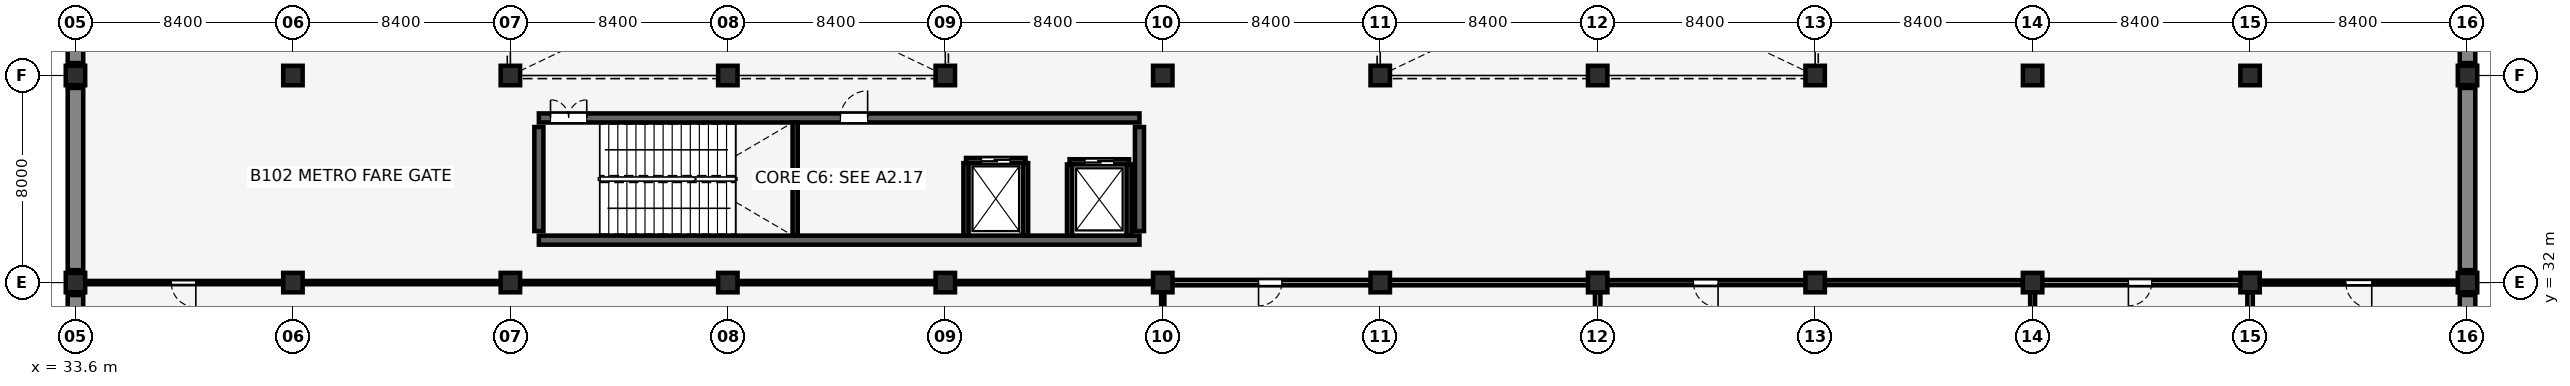
"""IFC4 building model, lengths in metres.
Left out: names, types, materials, properties, quantities, classifications, styles, units other than length and angle.
Written with IfcOpenShell. Run it as: python <this file> out.ifc"""

import sys

from ifc_helpers import new_model, si_unit, direction, frame, frame_2d, origin, origin_2d, place, context, subcontext, project, spatial, rectangle, extrude, element, fill, save


model = new_model("IFC4")
c1 = context("Model", 3, precision=1e-05, world=origin(), true_north=direction((0.0, 1.0)))
c2 = subcontext(c1, "Body", "Model", "MODEL_VIEW")
j1 = project(units=[si_unit("LENGTHUNIT", "METRE"), si_unit("PLANEANGLEUNIT", "RADIAN")], contexts=[c1])
p1 = place(None, origin())
s1 = spatial("IfcSite", under=j1, at=p1, CompositionType="ELEMENT")
p2 = place(p1, origin())
s2 = spatial("IfcBuilding", under=s1, at=p2, CompositionType="ELEMENT")
p3 = place(p2, frame((0.0, 0.0, -5.44)))
s3 = spatial("IfcBuildingStorey", under=s2, at=p3, CompositionType="ELEMENT", Elevation=-5.44)
for number, where, z_axis, x_axis in (
    (1, (33.6, 24.48, 0.0), (0.0, 0.0, 1.0), (0.0, 1.0, 0.0)),
    (2, (33.6, 32.48, 0.0), (0.0, 0.0, 1.0), (0.0, 1.0, 0.0)),
    (3, (33.6, 40.48, 0.0), (0.0, 0.0, 1.0), (0.0, 1.0, 0.0)),
    (4, (126.0, 24.48, 0.0), (0.0, 0.0, 1.0), (0.0, 1.0, 0.0)),
    (5, (126.0, 32.48, 0.0), (0.0, 0.0, 1.0), (0.0, 1.0, 0.0)),
    (6, (126.0, 40.48, 0.0), (0.0, 0.0, 1.0), (0.0, 1.0, 0.0)),
):
    element("IfcWall", number, at=place(p3, frame(where, z_axis=z_axis, x_axis=x_axis)), inside=s3, PredefinedType="SOLIDWALL", context=c2, shape_type="SweptSolid", body=[
        extrude(rectangle(XDim=7.04, YDim=0.6, at=frame_2d((3.52, 0.0))), origin(), (0.0, 0.0, 1.0), 5.02),
    ])
p4 = place(p3, frame((51.5, 33.64, 0.0), z_axis=(0.0, 0.0, 1.0), x_axis=(1.0, 0.0, 0.0)))
e7 = element("IfcWall", 7, at=p4, inside=s3, PredefinedType="SHEAR", context=c2, shape_type="SweptSolid", body=[
    extrude(rectangle(XDim=23.2, YDim=0.35, at=frame_2d((11.6, 0.0))), origin(), (0.0, 0.0, 1.0), 5.02),
])
p5 = place(p3, frame((51.5, 38.36, 0.0), z_axis=(0.0, 0.0, 1.0), x_axis=(1.0, 0.0, 0.0)))
e8 = element("IfcWall", 8, at=p5, inside=s3, PredefinedType="SHEAR", context=c2, shape_type="SweptSolid", body=[
    extrude(rectangle(XDim=23.2, YDim=0.35, at=frame_2d((11.6, 0.0))), origin(), (0.0, 0.0, 1.0), 5.02),
])
p6 = place(p5, frame((0.45, 0.0, 0.0), z_axis=(0.0, 0.0, 1.0), x_axis=(1.0, 0.0, 0.0)))
e9 = element("IfcOpeningElement", 9, at=p6, cuts=e8, PredefinedType="OPENING", context=c2, shape_type="SweptSolid", body=[
    extrude(rectangle(XDim=1.4, YDim=2.15, at=frame_2d((0.7, 1.075))), frame((0.0, 0.185, 0.0), z_axis=(0.0, -1.0, 0.0), x_axis=(1.0, 0.0, 0.0)), (0.0, 0.0, 1.0), 0.37),
])
p7 = place(p5, frame((11.65, 0.0, 0.0), z_axis=(0.0, 0.0, 1.0), x_axis=(1.0, 0.0, 0.0)))
e10 = element("IfcOpeningElement", 10, at=p7, cuts=e8, PredefinedType="OPENING", context=c2, shape_type="SweptSolid", body=[
    extrude(rectangle(XDim=1.05, YDim=2.15, at=frame_2d((0.525, 1.075))), frame((0.0, 0.185, 0.0), z_axis=(0.0, -1.0, 0.0), x_axis=(1.0, 0.0, 0.0)), (0.0, 0.0, 1.0), 0.37),
])
for number, where, z_axis, x_axis in (
    (11, (51.5, 33.99, 0.0), (0.0, 0.0, 1.0), (0.0, 1.0, 0.0)),
    (12, (74.7, 33.99, 0.0), (0.0, 0.0, 1.0), (0.0, 1.0, 0.0)),
):
    element("IfcWall", number, at=place(p3, frame(where, z_axis=z_axis, x_axis=x_axis)), inside=s3, PredefinedType="SHEAR", context=c2, shape_type="SweptSolid", body=[
        extrude(rectangle(XDim=4.02, YDim=0.35, at=frame_2d((2.01, 0.0))), origin(), (0.0, 0.0, 1.0), 5.02),
    ])
for number, where, z_axis, x_axis in (
    (13, (33.6, 32.0, 0.0), (0.0, 0.0, 1.0), (1.0, 0.0, 0.0)),
    (14, (33.6, 40.0, 0.0), (0.0, 0.0, 1.0), (1.0, 0.0, 0.0)),
    (15, (42.0, 32.0, 0.0), (0.0, 0.0, 1.0), (1.0, 0.0, 0.0)),
    (16, (42.0, 40.0, 0.0), (0.0, 0.0, 1.0), (1.0, 0.0, 0.0)),
    (17, (50.4, 32.0, 0.0), (0.0, 0.0, 1.0), (1.0, 0.0, 0.0)),
    (18, (50.4, 40.0, 0.0), (0.0, 0.0, 1.0), (1.0, 0.0, 0.0)),
    (19, (58.8, 32.0, 0.0), (0.0, 0.0, 1.0), (1.0, 0.0, 0.0)),
    (20, (58.8, 40.0, 0.0), (0.0, 0.0, 1.0), (1.0, 0.0, 0.0)),
    (21, (67.2, 32.0, 0.0), (0.0, 0.0, 1.0), (1.0, 0.0, 0.0)),
    (22, (67.2, 40.0, 0.0), (0.0, 0.0, 1.0), (1.0, 0.0, 0.0)),
    (23, (75.6, 32.0, 0.0), (0.0, 0.0, 1.0), (1.0, 0.0, 0.0)),
    (24, (75.6, 40.0, 0.0), (0.0, 0.0, 1.0), (1.0, 0.0, 0.0)),
    (25, (84.0, 32.0, 0.0), (0.0, 0.0, 1.0), (1.0, 0.0, 0.0)),
    (26, (84.0, 40.0, 0.0), (0.0, 0.0, 1.0), (1.0, 0.0, 0.0)),
    (27, (92.4, 32.0, 0.0), (0.0, 0.0, 1.0), (1.0, 0.0, 0.0)),
    (28, (92.4, 40.0, 0.0), (0.0, 0.0, 1.0), (1.0, 0.0, 0.0)),
    (29, (100.8, 32.0, 0.0), (0.0, 0.0, 1.0), (1.0, 0.0, 0.0)),
    (30, (100.8, 40.0, 0.0), (0.0, 0.0, 1.0), (1.0, 0.0, 0.0)),
    (31, (109.2, 32.0, 0.0), (0.0, 0.0, 1.0), (1.0, 0.0, 0.0)),
    (32, (109.2, 40.0, 0.0), (0.0, 0.0, 1.0), (1.0, 0.0, 0.0)),
    (33, (117.6, 32.0, 0.0), (0.0, 0.0, 1.0), (1.0, 0.0, 0.0)),
    (34, (117.6, 40.0, 0.0), (0.0, 0.0, 1.0), (1.0, 0.0, 0.0)),
    (35, (126.0, 32.0, 0.0), (0.0, 0.0, 1.0), (1.0, 0.0, 0.0)),
    (36, (126.0, 40.0, 0.0), (0.0, 0.0, 1.0), (1.0, 0.0, 0.0)),
):
    element("IfcColumn", number, at=place(p3, frame(where, z_axis=z_axis, x_axis=x_axis)), inside=s3, PredefinedType="COLUMN", context=c2, shape_type="SweptSolid", body=[
        extrude(rectangle(XDim=0.75, YDim=0.75, at=origin_2d()), origin(), (0.0, 0.0, 1.0), 5.02),
    ])
p8 = place(p3, frame((61.4, 33.815, 0.0), z_axis=(0.0, 0.0, 1.0), x_axis=(0.0, 1.0, 0.0)))
e37 = element("IfcWall", 37, at=p8, inside=s3, PredefinedType="SHEAR", context=c2, shape_type="SweptSolid", body=[
    extrude(rectangle(XDim=4.37, YDim=0.2, at=frame_2d((2.185, 0.0))), origin(), (0.0, 0.0, 1.0), 5.02),
])
p9 = place(p3, frame((68.0, 36.715, 0.0), z_axis=(0.0, 0.0, 1.0), x_axis=(1.0, 0.0, 0.0)))
e38 = element("IfcWall", 38, at=p9, inside=s3, PredefinedType="SHEAR", context=c2, shape_type="SweptSolid", body=[
    extrude(rectangle(XDim=2.3, YDim=0.2, at=frame_2d((1.15, 0.0))), origin(), (0.0, 0.0, 1.0), 5.02),
])
p10 = place(p9, frame((0.6, 0.0, 0.0), z_axis=(0.0, 0.0, 1.0), x_axis=(1.0, 0.0, 0.0)))
e39 = element("IfcOpeningElement", 39, at=p10, cuts=e38, PredefinedType="OPENING", context=c2, shape_type="SweptSolid", body=[
    extrude(rectangle(XDim=1.1, YDim=2.15, at=frame_2d((0.55, 1.075))), frame((0.0, 0.11, 0.0), z_axis=(0.0, -1.0, 0.0), x_axis=(1.0, 0.0, 0.0)), (0.0, 0.0, 1.0), 0.22),
])
for number, where, z_axis, x_axis in (
    (40, (68.0, 33.815, 0.0), (0.0, 0.0, 1.0), (0.0, 1.0, 0.0)),
    (41, (70.3, 33.815, 0.0), (0.0, 0.0, 1.0), (0.0, 1.0, 0.0)),
):
    element("IfcWall", number, at=place(p3, frame(where, z_axis=z_axis, x_axis=x_axis)), inside=s3, PredefinedType="SHEAR", context=c2, shape_type="SweptSolid", body=[
        extrude(rectangle(XDim=2.8, YDim=0.2, at=frame_2d((1.4, 0.0))), origin(), (0.0, 0.0, 1.0), 5.02),
    ])
p11 = place(p3, frame((72.0, 36.665, 0.0), z_axis=(0.0, 0.0, 1.0), x_axis=(1.0, 0.0, 0.0)))
e42 = element("IfcWall", 42, at=p11, inside=s3, PredefinedType="SHEAR", context=c2, shape_type="SweptSolid", body=[
    extrude(rectangle(XDim=2.3, YDim=0.2, at=frame_2d((1.15, 0.0))), origin(), (0.0, 0.0, 1.0), 5.02),
])
p12 = place(p11, frame((0.6, 0.0, 0.0), z_axis=(0.0, 0.0, 1.0), x_axis=(1.0, 0.0, 0.0)))
e43 = element("IfcOpeningElement", 43, at=p12, cuts=e42, PredefinedType="OPENING", context=c2, shape_type="SweptSolid", body=[
    extrude(rectangle(XDim=1.1, YDim=2.15, at=frame_2d((0.55, 1.075))), frame((0.0, 0.11, 0.0), z_axis=(0.0, -1.0, 0.0), x_axis=(1.0, 0.0, 0.0)), (0.0, 0.0, 1.0), 0.22),
])
for number, where, z_axis, x_axis in (
    (44, (72.0, 33.815, 0.0), (0.0, 0.0, 1.0), (0.0, 1.0, 0.0)),
    (45, (74.3, 33.815, 0.0), (0.0, 0.0, 1.0), (0.0, 1.0, 0.0)),
):
    element("IfcWall", number, at=place(p3, frame(where, z_axis=z_axis, x_axis=x_axis)), inside=s3, PredefinedType="SHEAR", context=c2, shape_type="SweptSolid", body=[
        extrude(rectangle(XDim=2.75, YDim=0.2, at=frame_2d((1.375, 0.0))), origin(), (0.0, 0.0, 1.0), 5.02),
    ])
p13 = place(p3, frame((33.965, 32.0, 0.0), z_axis=(0.0, 0.0, 1.0), x_axis=(1.0, 0.0, 0.0)))
e46 = element("IfcWall", 46, at=p13, inside=s3, PredefinedType="PARTITIONING", context=c2, shape_type="SweptSolid", body=[
    extrude(rectangle(XDim=7.67, YDim=0.125, at=frame_2d((3.835, 0.0))), origin(), (0.0, 0.0, 1.0), 4.07),
])
p14 = place(p13, frame((4.285, 0.0, 0.0), z_axis=(0.0, 0.0, 1.0), x_axis=(-1.0, 0.0, 0.0)))
e47 = element("IfcOpeningElement", 47, at=p14, cuts=e46, PredefinedType="OPENING", context=c2, shape_type="SweptSolid", body=[
    extrude(rectangle(XDim=0.95, YDim=2.15, at=frame_2d((0.475, 1.075))), frame((0.0, 0.073, 0.0), z_axis=(0.0, -1.0, 0.0), x_axis=(1.0, 0.0, 0.0)), (0.0, 0.0, 1.0), 0.145),
])
p15 = place(p3, frame((75.965, 32.0, 0.0), z_axis=(0.0, 0.0, 1.0), x_axis=(1.0, 0.0, 0.0)))
e48 = element("IfcWall", 48, at=p15, inside=s3, PredefinedType="PLUMBINGWALL", context=c2, shape_type="SweptSolid", body=[
    extrude(rectangle(XDim=7.67, YDim=0.21, at=frame_2d((3.835, 0.0))), origin(), (0.0, 0.0, 1.0), 4.07),
])
p16 = place(p15, frame((4.235, 0.0, 0.0), z_axis=(0.0, 0.0, 1.0), x_axis=(-1.0, 0.0, 0.0)))
e49 = element("IfcOpeningElement", 49, at=p16, cuts=e48, PredefinedType="OPENING", context=c2, shape_type="SweptSolid", body=[
    extrude(rectangle(XDim=0.9, YDim=2.15, at=frame_2d((0.45, 1.075))), frame((0.0, 0.115, 0.0), z_axis=(0.0, -1.0, 0.0), x_axis=(1.0, 0.0, 0.0)), (0.0, 0.0, 1.0), 0.23),
])
p17 = place(p3, frame((92.765, 32.0, 0.0), z_axis=(0.0, 0.0, 1.0), x_axis=(1.0, 0.0, 0.0)))
e50 = element("IfcWall", 50, at=p17, inside=s3, PredefinedType="PLUMBINGWALL", context=c2, shape_type="SweptSolid", body=[
    extrude(rectangle(XDim=7.67, YDim=0.19, at=frame_2d((3.835, 0.0))), origin(), (0.0, 0.0, 1.0), 4.07),
])
p18 = place(p17, frame((4.285, 0.0, 0.0), z_axis=(0.0, 0.0, 1.0), x_axis=(-1.0, 0.0, 0.0)))
e51 = element("IfcOpeningElement", 51, at=p18, cuts=e50, PredefinedType="OPENING", context=c2, shape_type="SweptSolid", body=[
    extrude(rectangle(XDim=0.95, YDim=2.15, at=frame_2d((0.475, 1.075))), frame((0.0, 0.105, 0.0), z_axis=(0.0, -1.0, 0.0), x_axis=(1.0, 0.0, 0.0)), (0.0, 0.0, 1.0), 0.21),
])
p19 = place(p3, frame((109.565, 32.0, 0.0), z_axis=(0.0, 0.0, 1.0), x_axis=(1.0, 0.0, 0.0)))
e52 = element("IfcWall", 52, at=p19, inside=s3, PredefinedType="PLUMBINGWALL", context=c2, shape_type="SweptSolid", body=[
    extrude(rectangle(XDim=7.67, YDim=0.21, at=frame_2d((3.835, 0.0))), origin(), (0.0, 0.0, 1.0), 4.07),
])
p20 = place(p19, frame((4.235, 0.0, 0.0), z_axis=(0.0, 0.0, 1.0), x_axis=(-1.0, 0.0, 0.0)))
e53 = element("IfcOpeningElement", 53, at=p20, cuts=e52, PredefinedType="OPENING", context=c2, shape_type="SweptSolid", body=[
    extrude(rectangle(XDim=0.9, YDim=2.15, at=frame_2d((0.45, 1.075))), frame((0.0, 0.115, 0.0), z_axis=(0.0, -1.0, 0.0), x_axis=(1.0, 0.0, 0.0)), (0.0, 0.0, 1.0), 0.23),
])
p21 = place(p3, frame((117.965, 32.0, 0.0), z_axis=(0.0, 0.0, 1.0), x_axis=(1.0, 0.0, 0.0)))
e54 = element("IfcWall", 54, at=p21, inside=s3, PredefinedType="PARTITIONING", context=c2, shape_type="SweptSolid", body=[
    extrude(rectangle(XDim=7.67, YDim=0.15, at=frame_2d((3.835, 0.0))), origin(), (0.0, 0.0, 1.0), 4.07),
])
p22 = place(p21, frame((4.335, 0.0, 0.0), z_axis=(0.0, 0.0, 1.0), x_axis=(-1.0, 0.0, 0.0)))
e55 = element("IfcOpeningElement", 55, at=p22, cuts=e54, PredefinedType="OPENING", context=c2, shape_type="SweptSolid", body=[
    extrude(rectangle(XDim=1.0, YDim=2.15, at=frame_2d((0.5, 1.075))), frame((0.0, 0.085, 0.0), z_axis=(0.0, -1.0, 0.0), x_axis=(1.0, 0.0, 0.0)), (0.0, 0.0, 1.0), 0.17),
])
p23 = place(p3, frame((42.365, 32.0, 0.0), z_axis=(0.0, 0.0, 1.0), x_axis=(1.0, 0.0, 0.0)))
e56 = element("IfcWall", 56, at=p23, inside=s3, PredefinedType="PARTITIONING", context=c2, shape_type="SweptSolid", body=[
    extrude(rectangle(XDim=7.67, YDim=0.125, at=frame_2d((3.835, 0.0))), origin(), (0.0, 0.0, 1.0), 4.07),
])
p24 = place(p3, frame((50.765, 32.0, 0.0), z_axis=(0.0, 0.0, 1.0), x_axis=(1.0, 0.0, 0.0)))
e57 = element("IfcWall", 57, at=p24, inside=s3, PredefinedType="PARTITIONING", context=c2, shape_type="SweptSolid", body=[
    extrude(rectangle(XDim=7.67, YDim=0.125, at=frame_2d((3.835, 0.0))), origin(), (0.0, 0.0, 1.0), 4.07),
])
p25 = place(p3, frame((59.165, 32.0, 0.0), z_axis=(0.0, 0.0, 1.0), x_axis=(1.0, 0.0, 0.0)))
e58 = element("IfcWall", 58, at=p25, inside=s3, PredefinedType="PARTITIONING", context=c2, shape_type="SweptSolid", body=[
    extrude(rectangle(XDim=7.67, YDim=0.125, at=frame_2d((3.835, 0.0))), origin(), (0.0, 0.0, 1.0), 4.07),
])
p26 = place(p3, frame((67.565, 32.0, 0.0), z_axis=(0.0, 0.0, 1.0), x_axis=(1.0, 0.0, 0.0)))
e59 = element("IfcWall", 59, at=p26, inside=s3, PredefinedType="PARTITIONING", context=c2, shape_type="SweptSolid", body=[
    extrude(rectangle(XDim=7.67, YDim=0.125, at=frame_2d((3.835, 0.0))), origin(), (0.0, 0.0, 1.0), 4.07),
])
p27 = place(p3, frame((75.6, 24.365, 0.0), z_axis=(0.0, 0.0, 1.0), x_axis=(0.0, 1.0, 0.0)))
e60 = element("IfcWall", 60, at=p27, inside=s3, PredefinedType="PARTITIONING", context=c2, shape_type="SweptSolid", body=[
    extrude(rectangle(XDim=7.27, YDim=0.125, at=frame_2d((3.635, 0.0))), origin(), (0.0, 0.0, 1.0), 4.37),
])
p28 = place(p3, frame((84.365, 32.0, 0.0), z_axis=(0.0, 0.0, 1.0), x_axis=(1.0, 0.0, 0.0)))
e61 = element("IfcWall", 61, at=p28, inside=s3, PredefinedType="PLUMBINGWALL", context=c2, shape_type="SweptSolid", body=[
    extrude(rectangle(XDim=7.67, YDim=0.21, at=frame_2d((3.835, 0.0))), origin(), (0.0, 0.0, 1.0), 4.07),
])
p29 = place(p3, frame((92.4, 24.365, 0.0), z_axis=(0.0, 0.0, 1.0), x_axis=(0.0, 1.0, 0.0)))
e62 = element("IfcWall", 62, at=p29, inside=s3, PredefinedType="PLUMBINGWALL", context=c2, shape_type="SweptSolid", body=[
    extrude(rectangle(XDim=7.27, YDim=0.21, at=frame_2d((3.635, 0.0))), origin(), (0.0, 0.0, 1.0), 4.37),
])
p30 = place(p3, frame((101.165, 32.0, 0.0), z_axis=(0.0, 0.0, 1.0), x_axis=(1.0, 0.0, 0.0)))
e63 = element("IfcWall", 63, at=p30, inside=s3, PredefinedType="PLUMBINGWALL", context=c2, shape_type="SweptSolid", body=[
    extrude(rectangle(XDim=7.67, YDim=0.19, at=frame_2d((3.835, 0.0))), origin(), (0.0, 0.0, 1.0), 4.07),
])
p31 = place(p3, frame((109.2, 24.365, 0.0), z_axis=(0.0, 0.0, 1.0), x_axis=(0.0, 1.0, 0.0)))
e64 = element("IfcWall", 64, at=p31, inside=s3, PredefinedType="PLUMBINGWALL", context=c2, shape_type="SweptSolid", body=[
    extrude(rectangle(XDim=7.27, YDim=0.19, at=frame_2d((3.635, 0.0))), origin(), (0.0, 0.0, 1.0), 4.37),
])
p32 = place(p3, frame((117.6, 24.365, 0.0), z_axis=(0.0, 0.0, 1.0), x_axis=(0.0, 1.0, 0.0)))
e65 = element("IfcWall", 65, at=p32, inside=s3, PredefinedType="PLUMBINGWALL", context=c2, shape_type="SweptSolid", body=[
    extrude(rectangle(XDim=7.27, YDim=0.21, at=frame_2d((3.635, 0.0))), origin(), (0.0, 0.0, 1.0), 4.37),
])
p33 = place(p6, origin())
e66 = element("IfcDoor", 66, at=p33, inside=s3, OperationType="DOUBLE_DOOR_SINGLE_SWING", PredefinedType="DOOR", context=c2, shape_type="SweptSolid", body=[
    extrude(rectangle(XDim=1.4, YDim=2.15, at=frame_2d((0.7, 1.075))), frame((0.0, 0.025, 0.0), z_axis=(0.0, -1.0, 0.0), x_axis=(1.0, 0.0, 0.0)), (0.0, 0.0, 1.0), 0.05),
])
fill(e9, e66)
p34 = place(p7, origin())
e67 = element("IfcDoor", 67, at=p34, inside=s3, OperationType="SINGLE_SWING_RIGHT", PredefinedType="DOOR", context=c2, shape_type="SweptSolid", body=[
    extrude(rectangle(XDim=1.05, YDim=2.15, at=frame_2d((0.525, 1.075))), frame((0.0, 0.025, 0.0), z_axis=(0.0, -1.0, 0.0), x_axis=(1.0, 0.0, 0.0)), (0.0, 0.0, 1.0), 0.05),
])
fill(e10, e67)
p35 = place(p10, origin())
e68 = element("IfcDoor", 68, at=p35, inside=s3, OperationType="DOUBLE_DOOR_SLIDING", PredefinedType="DOOR", context=c2, shape_type="SweptSolid", body=[
    extrude(rectangle(XDim=1.1, YDim=2.15, at=frame_2d((0.55, 1.075))), frame((0.0, 0.025, 0.0), z_axis=(0.0, -1.0, 0.0), x_axis=(1.0, 0.0, 0.0)), (0.0, 0.0, 1.0), 0.05),
])
fill(e39, e68)
p36 = place(p12, origin())
e69 = element("IfcDoor", 69, at=p36, inside=s3, OperationType="DOUBLE_DOOR_SLIDING", PredefinedType="DOOR", context=c2, shape_type="SweptSolid", body=[
    extrude(rectangle(XDim=1.1, YDim=2.15, at=frame_2d((0.55, 1.075))), frame((0.0, 0.025, 0.0), z_axis=(0.0, -1.0, 0.0), x_axis=(1.0, 0.0, 0.0)), (0.0, 0.0, 1.0), 0.05),
])
fill(e43, e69)
p37 = place(p14, origin())
e70 = element("IfcDoor", 70, at=p37, inside=s3, OperationType="SINGLE_SWING_LEFT", PredefinedType="DOOR", context=c2, shape_type="SweptSolid", body=[
    extrude(rectangle(XDim=0.95, YDim=2.15, at=frame_2d((0.475, 1.075))), frame((0.0, 0.025, 0.0), z_axis=(0.0, -1.0, 0.0), x_axis=(1.0, 0.0, 0.0)), (0.0, 0.0, 1.0), 0.05),
])
fill(e47, e70)
p38 = place(p16, origin())
e71 = element("IfcDoor", 71, at=p38, inside=s3, OperationType="SINGLE_SWING_RIGHT", PredefinedType="DOOR", context=c2, shape_type="SweptSolid", body=[
    extrude(rectangle(XDim=0.9, YDim=2.15, at=frame_2d((0.45, 1.075))), frame((0.0, 0.025, 0.0), z_axis=(0.0, -1.0, 0.0), x_axis=(1.0, 0.0, 0.0)), (0.0, 0.0, 1.0), 0.05),
])
fill(e49, e71)
p39 = place(p18, origin())
e72 = element("IfcDoor", 72, at=p39, inside=s3, OperationType="SINGLE_SWING_LEFT", PredefinedType="DOOR", context=c2, shape_type="SweptSolid", body=[
    extrude(rectangle(XDim=0.95, YDim=2.15, at=frame_2d((0.475, 1.075))), frame((0.0, 0.025, 0.0), z_axis=(0.0, -1.0, 0.0), x_axis=(1.0, 0.0, 0.0)), (0.0, 0.0, 1.0), 0.05),
])
fill(e51, e72)
p40 = place(p20, origin())
e73 = element("IfcDoor", 73, at=p40, inside=s3, OperationType="SINGLE_SWING_RIGHT", PredefinedType="DOOR", context=c2, shape_type="SweptSolid", body=[
    extrude(rectangle(XDim=0.9, YDim=2.15, at=frame_2d((0.45, 1.075))), frame((0.0, 0.025, 0.0), z_axis=(0.0, -1.0, 0.0), x_axis=(1.0, 0.0, 0.0)), (0.0, 0.0, 1.0), 0.05),
])
fill(e53, e73)
p41 = place(p22, origin())
e74 = element("IfcDoor", 74, at=p41, inside=s3, OperationType="SINGLE_SWING_LEFT", PredefinedType="DOOR", context=c2, shape_type="SweptSolid", body=[
    extrude(rectangle(XDim=1.0, YDim=2.15, at=frame_2d((0.5, 1.075))), frame((0.0, 0.025, 0.0), z_axis=(0.0, -1.0, 0.0), x_axis=(1.0, 0.0, 0.0)), (0.0, 0.0, 1.0), 0.05),
])
fill(e55, e74)
save(model, sys.argv[1])
